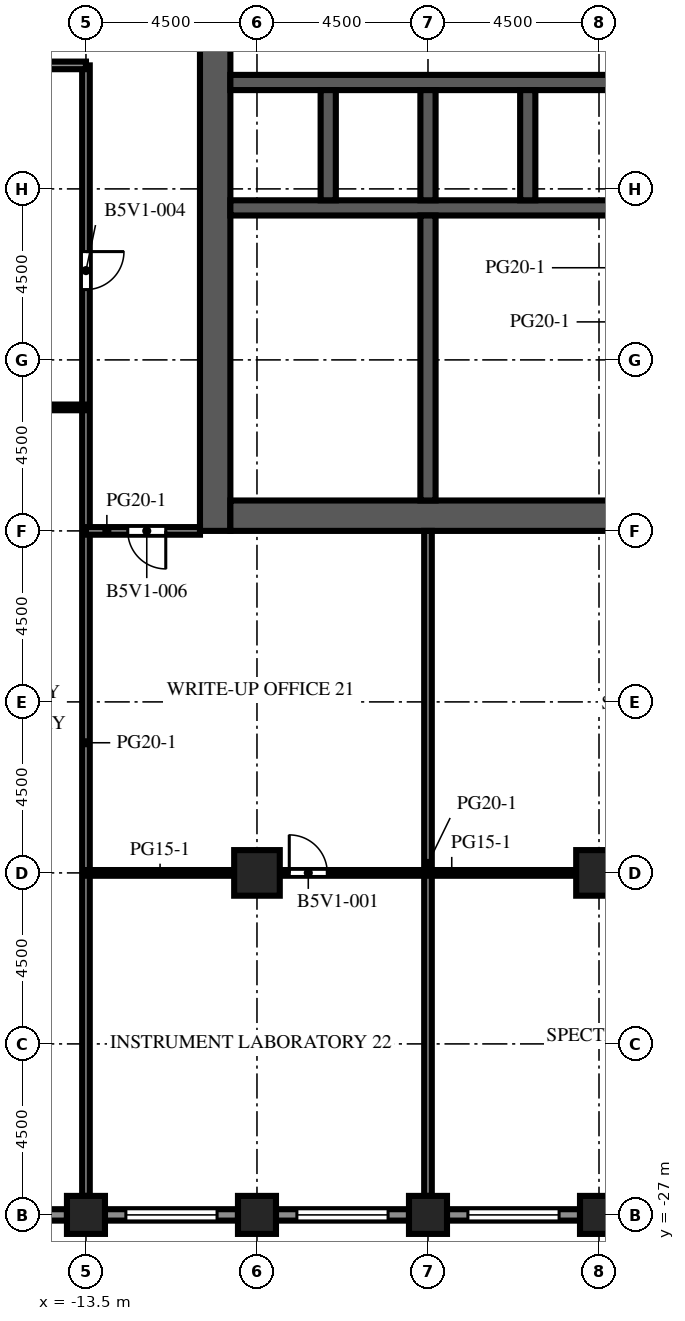
"""IFC4 building model, lengths in metres.
Left out: names, types, materials, properties, quantities, classifications, styles, units other than length and angle.
Written with IfcOpenShell. Run it as: python <this file> out.ifc"""

import sys

from ifc_helpers import new_model, si_unit, direction, frame, frame_2d, origin, origin_2d, place, context, subcontext, project, spatial, rectangle, extrude, element, fill, save


model = new_model("IFC4")
c1 = context("Model", 3, precision=1e-05, world=origin(), true_north=direction((0.0, 1.0)))
c2 = subcontext(c1, "Body", "Model", "MODEL_VIEW")
j1 = project(units=[si_unit("LENGTHUNIT", "METRE"), si_unit("PLANEANGLEUNIT", "RADIAN")], contexts=[c1])
p1 = place(None, origin())
s1 = spatial("IfcSite", under=j1, at=p1, CompositionType="ELEMENT")
p2 = place(p1, origin())
s2 = spatial("IfcBuilding", under=s1, at=p2, CompositionType="ELEMENT")
p3 = place(p2, frame((0.0, 0.0, 169.1)))
s3 = spatial("IfcBuildingStorey", under=s2, at=p3, CompositionType="ELEMENT", Elevation=169.1)
for number, where, z_axis, x_axis in (
    (1, (-13.5, -27.0, 0.0), (0.0, 0.0, 1.0), (1.0, 0.0, 0.0)),
    (2, (-9.0, -27.0, 0.0), (0.0, 0.0, 1.0), (1.0, 0.0, 0.0)),
    (3, (-4.5, -27.0, 0.0), (0.0, 0.0, 1.0), (1.0, 0.0, 0.0)),
    (4, (0.0, -27.0, 0.0), (0.0, 0.0, 1.0), (1.0, 0.0, 0.0)),
):
    element("IfcColumn", number, at=place(p3, frame(where, z_axis=z_axis, x_axis=x_axis)), inside=s3, PredefinedType="COLUMN", context=c2, shape_type="SweptSolid", body=[
        extrude(rectangle(XDim=1.0, YDim=1.0, at=origin_2d()), origin(), (0.0, 0.0, 1.0), 4.1),
    ])
for number, where, z_axis, x_axis in (
    (5, (-9.0, -18.0, 0.0), (0.0, 0.0, 1.0), (1.0, 0.0, 0.0)),
    (6, (0.0, -18.0, 0.0), (0.0, 0.0, 1.0), (1.0, 0.0, 0.0)),
):
    element("IfcColumn", number, at=place(p3, frame(where, z_axis=z_axis, x_axis=x_axis)), inside=s3, PredefinedType="COLUMN", context=c2, shape_type="SweptSolid", body=[
        extrude(rectangle(XDim=1.2, YDim=1.2, at=origin_2d()), origin(), (0.0, 0.0, 1.0), 4.1),
    ])
p4 = place(p3, frame((-10.1, -9.0, 0.0), z_axis=(0.0, 0.0, 1.0), x_axis=(0.0, 1.0, 0.0)))
e7 = element("IfcWall", 7, at=p4, inside=s3, PredefinedType="SHEAR", context=c2, shape_type="SweptSolid", body=[
    extrude(rectangle(XDim=27.5, YDim=0.8, at=frame_2d((13.75, 0.0))), origin(), (0.0, 0.0, 1.0), 4.1),
])
p5 = place(p4, frame((12.55, 0.0, 0.0)))
e8 = element("IfcOpeningElement", 8, at=p5, cuts=e7, PredefinedType="OPENING", context=c2, shape_type="SweptSolid", body=[
    extrude(rectangle(XDim=2.4, YDim=2.4, at=frame_2d((1.2, 1.2))), frame((0.0, 0.41, 0.0), z_axis=(0.0, -1.0, 0.0), x_axis=(1.0, 0.0, 0.0)), (0.0, 0.0, 1.0), 0.82),
])
p6 = place(p4, frame((6.825, 0.0, 0.0)))
e9 = element("IfcOpeningElement", 9, at=p6, cuts=e7, PredefinedType="OPENING", context=c2, shape_type="SweptSolid", body=[
    extrude(rectangle(XDim=1.2, YDim=2.1, at=frame_2d((0.6, 1.05))), frame((0.0, 0.41, 0.0), z_axis=(0.0, -1.0, 0.0), x_axis=(1.0, 0.0, 0.0)), (0.0, 0.0, 1.0), 0.82),
])
p7 = place(p4, frame((19.475, 0.0, 0.0)))
e10 = element("IfcOpeningElement", 10, at=p7, cuts=e7, PredefinedType="OPENING", context=c2, shape_type="SweptSolid", body=[
    extrude(rectangle(XDim=1.2, YDim=2.1, at=frame_2d((0.6, 1.05))), frame((0.0, 0.41, 0.0), z_axis=(0.0, -1.0, 0.0), x_axis=(1.0, 0.0, 0.0)), (0.0, 0.0, 1.0), 0.82),
])
p8 = place(p3, frame((-9.7, -8.6, 0.0), z_axis=(0.0, 0.0, 1.0), x_axis=(1.0, 0.0, 0.0)))
e11 = element("IfcWall", 11, at=p8, inside=s3, PredefinedType="SHEAR", context=c2, shape_type="SweptSolid", body=[
    extrude(rectangle(XDim=10.4, YDim=0.8, at=frame_2d((5.2, 0.0))), origin(), (0.0, 0.0, 1.0), 4.1),
])
p9 = place(p3, frame((-9.7, -0.5, 0.0), z_axis=(0.0, 0.0, 1.0), x_axis=(1.0, 0.0, 0.0)))
e12 = element("IfcWall", 12, at=p9, inside=s3, PredefinedType="SHEAR", context=c2, shape_type="SweptSolid", body=[
    extrude(rectangle(XDim=10.4, YDim=0.4, at=frame_2d((5.2, 0.0))), origin(), (0.0, 0.0, 1.0), 4.1),
])
p10 = place(p3, frame((-9.7, 2.8, 0.0), z_axis=(0.0, 0.0, 1.0), x_axis=(1.0, 0.0, 0.0)))
e13 = element("IfcWall", 13, at=p10, inside=s3, PredefinedType="SHEAR", context=c2, shape_type="SweptSolid", body=[
    extrude(rectangle(XDim=10.4, YDim=0.4, at=frame_2d((5.2, 0.0))), origin(), (0.0, 0.0, 1.0), 4.1),
])
p11 = place(p10, frame((0.738, 0.0, 0.0)))
e14 = element("IfcOpeningElement", 14, at=p11, cuts=e13, PredefinedType="OPENING", context=c2, shape_type="SweptSolid", body=[
    extrude(rectangle(XDim=1.1, YDim=2.1, at=frame_2d((0.55, 1.05))), frame((0.0, 0.21, 0.0), z_axis=(0.0, -1.0, 0.0), x_axis=(1.0, 0.0, 0.0)), (0.0, 0.0, 1.0), 0.42),
])
p12 = place(p10, frame((3.337, 0.0, 0.0)))
e15 = element("IfcOpeningElement", 15, at=p12, cuts=e13, PredefinedType="OPENING", context=c2, shape_type="SweptSolid", body=[
    extrude(rectangle(XDim=1.1, YDim=2.1, at=frame_2d((0.55, 1.05))), frame((0.0, 0.21, 0.0), z_axis=(0.0, -1.0, 0.0), x_axis=(1.0, 0.0, 0.0)), (0.0, 0.0, 1.0), 0.42),
])
p13 = place(p10, frame((6.012, 0.0, 0.0)))
e16 = element("IfcOpeningElement", 16, at=p13, cuts=e13, PredefinedType="OPENING", context=c2, shape_type="SweptSolid", body=[
    extrude(rectangle(XDim=1.0, YDim=2.1, at=frame_2d((0.5, 1.05))), frame((0.0, 0.21, 0.0), z_axis=(0.0, -1.0, 0.0), x_axis=(1.0, 0.0, 0.0)), (0.0, 0.0, 1.0), 0.42),
])
p14 = place(p10, frame((8.613, 0.0, 0.0)))
e17 = element("IfcOpeningElement", 17, at=p14, cuts=e13, PredefinedType="OPENING", context=c2, shape_type="SweptSolid", body=[
    extrude(rectangle(XDim=1.0, YDim=2.1, at=frame_2d((0.5, 1.05))), frame((0.0, 0.21, 0.0), z_axis=(0.0, -1.0, 0.0), x_axis=(1.0, 0.0, 0.0)), (0.0, 0.0, 1.0), 0.42),
])
for number, where, z_axis, x_axis in (
    (18, (-7.125, -0.3, 0.0), (0.0, 0.0, 1.0), (0.0, 1.0, 0.0)),
    (19, (-4.5, -0.3, 0.0), (0.0, 0.0, 1.0), (0.0, 1.0, 0.0)),
    (20, (-1.875, -0.3, 0.0), (0.0, 0.0, 1.0), (0.0, 1.0, 0.0)),
):
    element("IfcWall", number, at=place(p3, frame(where, z_axis=z_axis, x_axis=x_axis)), inside=s3, PredefinedType="SHEAR", context=c2, shape_type="SweptSolid", body=[
        extrude(rectangle(XDim=2.9, YDim=0.4, at=frame_2d((1.45, 0.0))), origin(), (0.0, 0.0, 1.0), 4.1),
    ])
p15 = place(p3, frame((-4.5, -8.2, 0.0), z_axis=(0.0, 0.0, 1.0), x_axis=(0.0, 1.0, 0.0)))
e21 = element("IfcWall", 21, at=p15, inside=s3, PredefinedType="SHEAR", context=c2, shape_type="SweptSolid", body=[
    extrude(rectangle(XDim=7.5, YDim=0.4, at=frame_2d((3.75, 0.0))), origin(), (0.0, 0.0, 1.0), 4.1),
])
p16 = place(p3, frame((-14.0, -27.0, 0.0), z_axis=(0.0, 0.0, 1.0), x_axis=(-1.0, 0.0, 0.0)))
e22 = element("IfcWall", 22, at=p16, inside=s3, PredefinedType="SOLIDWALL", context=c2, shape_type="SweptSolid", body=[
    extrude(rectangle(XDim=3.5, YDim=0.3, at=frame_2d((1.75, 0.0))), origin(), (0.0, 0.0, 1.0), 2.85),
])
p17 = place(p16, frame((1.25, 0.0, 0.0)))
e23 = element("IfcOpeningElement", 23, at=p17, cuts=e22, PredefinedType="OPENING", context=c2, shape_type="SweptSolid", body=[
    extrude(rectangle(XDim=1.0, YDim=2.2, at=frame_2d((0.5, 1.1))), frame((0.0, 0.16, 0.0), z_axis=(0.0, -1.0, 0.0), x_axis=(1.0, 0.0, 0.0)), (0.0, 0.0, 1.0), 0.32),
])
p18 = place(p3, frame((-9.5, -27.0, 0.0), z_axis=(0.0, 0.0, 1.0), x_axis=(-1.0, 0.0, 0.0)))
e24 = element("IfcWall", 24, at=p18, inside=s3, PredefinedType="SOLIDWALL", context=c2, shape_type="SweptSolid", body=[
    extrude(rectangle(XDim=3.5, YDim=0.3, at=frame_2d((1.75, 0.0))), origin(), (0.0, 0.0, 1.0), 2.85),
])
p19 = place(p18, frame((0.55, 0.0, 0.8)))
e25 = element("IfcOpeningElement", 25, at=p19, cuts=e24, PredefinedType="OPENING", context=c2, shape_type="SweptSolid", body=[
    extrude(rectangle(XDim=2.4, YDim=1.7, at=frame_2d((1.2, 0.85))), frame((0.0, 0.16, 0.0), z_axis=(0.0, -1.0, 0.0), x_axis=(1.0, 0.0, 0.0)), (0.0, 0.0, 1.0), 0.32),
])
p20 = place(p3, frame((-5.0, -27.0, 0.0), z_axis=(0.0, 0.0, 1.0), x_axis=(-1.0, 0.0, 0.0)))
e26 = element("IfcWall", 26, at=p20, inside=s3, PredefinedType="SOLIDWALL", context=c2, shape_type="SweptSolid", body=[
    extrude(rectangle(XDim=3.5, YDim=0.3, at=frame_2d((1.75, 0.0))), origin(), (0.0, 0.0, 1.0), 2.85),
])
p21 = place(p20, frame((0.55, 0.0, 0.8)))
e27 = element("IfcOpeningElement", 27, at=p21, cuts=e26, PredefinedType="OPENING", context=c2, shape_type="SweptSolid", body=[
    extrude(rectangle(XDim=2.4, YDim=1.7, at=frame_2d((1.2, 0.85))), frame((0.0, 0.16, 0.0), z_axis=(0.0, -1.0, 0.0), x_axis=(1.0, 0.0, 0.0)), (0.0, 0.0, 1.0), 0.32),
])
p22 = place(p3, frame((-0.5, -27.0, 0.0), z_axis=(0.0, 0.0, 1.0), x_axis=(-1.0, 0.0, 0.0)))
e28 = element("IfcWall", 28, at=p22, inside=s3, PredefinedType="SOLIDWALL", context=c2, shape_type="SweptSolid", body=[
    extrude(rectangle(XDim=3.5, YDim=0.3, at=frame_2d((1.75, 0.0))), origin(), (0.0, 0.0, 1.0), 2.85),
])
p23 = place(p22, frame((0.55, 0.0, 0.8)))
e29 = element("IfcOpeningElement", 29, at=p23, cuts=e28, PredefinedType="OPENING", context=c2, shape_type="SweptSolid", body=[
    extrude(rectangle(XDim=2.4, YDim=1.7, at=frame_2d((1.2, 0.85))), frame((0.0, 0.16, 0.0), z_axis=(0.0, -1.0, 0.0), x_axis=(1.0, 0.0, 0.0)), (0.0, 0.0, 1.0), 0.32),
])
p24 = place(p3, frame((-0.8, -8.2, 0.0), z_axis=(0.0, 0.0, 1.0), x_axis=(0.0, 1.0, 0.0)))
e30 = element("IfcWall", 30, at=p24, inside=s3, PredefinedType="PARTITIONING", context=c2, shape_type="SweptSolid", body=[
    extrude(rectangle(XDim=2.55, YDim=0.1, at=frame_2d((1.275, 0.0))), origin(), (0.0, 0.0, 1.0), 3.65),
])
p25 = place(p24, frame((0.775, 0.0, 0.0)))
e31 = element("IfcOpeningElement", 31, at=p25, cuts=e30, PredefinedType="OPENING", context=c2, shape_type="SweptSolid", body=[
    extrude(rectangle(XDim=1.0, YDim=2.1, at=frame_2d((0.5, 1.05))), frame((0.0, 0.06, 0.0), z_axis=(0.0, -1.0, 0.0), x_axis=(1.0, 0.0, 0.0)), (0.0, 0.0, 1.0), 0.12),
])
p26 = place(p3, frame((-0.8, -5.65, 0.0), z_axis=(0.0, 0.0, 1.0), x_axis=(0.0, 1.0, 0.0)))
e32 = element("IfcWall", 32, at=p26, inside=s3, PredefinedType="PARTITIONING", context=c2, shape_type="SweptSolid", body=[
    extrude(rectangle(XDim=2.1, YDim=0.1, at=frame_2d((1.05, 0.0))), origin(), (0.0, 0.0, 1.0), 3.65),
])
p27 = place(p26, frame((0.55, 0.0, 0.0)))
e33 = element("IfcOpeningElement", 33, at=p27, cuts=e32, PredefinedType="OPENING", context=c2, shape_type="SweptSolid", body=[
    extrude(rectangle(XDim=1.0, YDim=2.1, at=frame_2d((0.5, 1.05))), frame((0.0, 0.06, 0.0), z_axis=(0.0, -1.0, 0.0), x_axis=(1.0, 0.0, 0.0)), (0.0, 0.0, 1.0), 0.12),
])
p28 = place(p3, frame((-0.8, -3.55, 0.0), z_axis=(0.0, 0.0, 1.0), x_axis=(0.0, 1.0, 0.0)))
e34 = element("IfcWall", 34, at=p28, inside=s3, PredefinedType="PARTITIONING", context=c2, shape_type="SweptSolid", body=[
    extrude(rectangle(XDim=2.85, YDim=0.1, at=frame_2d((1.425, 0.0))), origin(), (0.0, 0.0, 1.0), 3.65),
])
p29 = place(p28, frame((0.925, 0.0, 0.0)))
e35 = element("IfcOpeningElement", 35, at=p29, cuts=e34, PredefinedType="OPENING", context=c2, shape_type="SweptSolid", body=[
    extrude(rectangle(XDim=1.0, YDim=2.1, at=frame_2d((0.5, 1.05))), frame((0.0, 0.06, 0.0), z_axis=(0.0, -1.0, 0.0), x_axis=(1.0, 0.0, 0.0)), (0.0, 0.0, 1.0), 0.12),
])
for number, where, z_axis, x_axis in (
    (36, (-4.3, -5.65, 0.0), (0.0, 0.0, 1.0), (1.0, 0.0, 0.0)),
    (37, (-4.3, -3.55, 0.0), (0.0, 0.0, 1.0), (1.0, 0.0, 0.0)),
):
    element("IfcWall", number, at=place(p3, frame(where, z_axis=z_axis, x_axis=x_axis)), inside=s3, PredefinedType="PARTITIONING", context=c2, shape_type="SweptSolid", body=[
        extrude(rectangle(XDim=3.5, YDim=0.1, at=frame_2d((1.75, 0.0))), origin(), (0.0, 0.0, 1.0), 3.65),
    ])
p30 = place(p3, frame((-13.5, -26.5, 0.0), z_axis=(0.0, 0.0, 1.0), x_axis=(0.0, 1.0, 0.0)))
e38 = element("IfcWall", 38, at=p30, inside=s3, PredefinedType="PARTITIONING", context=c2, shape_type="SweptSolid", body=[
    extrude(rectangle(XDim=29.75, YDim=0.2, at=frame_2d((14.875, 0.0))), origin(), (0.0, 0.0, 1.0), 3.65),
])
p31 = place(p30, frame((23.85, 0.0, 0.0)))
e39 = element("IfcOpeningElement", 39, at=p31, cuts=e38, PredefinedType="OPENING", context=c2, shape_type="SweptSolid", body=[
    extrude(rectangle(XDim=1.0, YDim=2.1, at=frame_2d((0.5, 1.05))), frame((0.0, 0.11, 0.0), z_axis=(0.0, -1.0, 0.0), x_axis=(1.0, 0.0, 0.0)), (0.0, 0.0, 1.0), 0.22),
])
p32 = place(p3, frame((-4.5, -26.5, 0.0), z_axis=(0.0, 0.0, 1.0), x_axis=(0.0, 1.0, 0.0)))
e40 = element("IfcWall", 40, at=p32, inside=s3, PredefinedType="PARTITIONING", context=c2, shape_type="SweptSolid", body=[
    extrude(rectangle(XDim=17.5, YDim=0.2, at=frame_2d((8.75, 0.0))), origin(), (0.0, 0.0, 1.0), 3.65),
])
p33 = place(p3, frame((-13.5, -18.0, 0.0), z_axis=(0.0, 0.0, 1.0), x_axis=(1.0, 0.0, 0.0)))
e41 = element("IfcWall", 41, at=p33, inside=s3, PredefinedType="PARTITIONING", context=c2, shape_type="SweptSolid", body=[
    extrude(rectangle(XDim=3.9, YDim=0.15, at=frame_2d((1.95, 0.0))), origin(), (0.0, 0.0, 1.0), 3.65),
])
p34 = place(p3, frame((-0.6, -18.0, 0.0), z_axis=(0.0, 0.0, 1.0), x_axis=(-1.0, 0.0, 0.0)))
e42 = element("IfcWall", 42, at=p34, inside=s3, PredefinedType="PARTITIONING", context=c2, shape_type="SweptSolid", body=[
    extrude(rectangle(XDim=7.8, YDim=0.15, at=frame_2d((3.9, 0.0))), origin(), (0.0, 0.0, 1.0), 3.65),
])
p35 = place(p34, frame((6.55, 0.0, 0.0)))
e43 = element("IfcOpeningElement", 43, at=p35, cuts=e42, PredefinedType="OPENING", context=c2, shape_type="SweptSolid", body=[
    extrude(rectangle(XDim=1.0, YDim=2.1, at=frame_2d((0.5, 1.05))), frame((0.0, 0.085, 0.0), z_axis=(0.0, -1.0, 0.0), x_axis=(1.0, 0.0, 0.0)), (0.0, 0.0, 1.0), 0.17),
])
p36 = place(p3, frame((-10.5, -9.0, 0.0), z_axis=(0.0, 0.0, 1.0), x_axis=(-1.0, 0.0, 0.0)))
e44 = element("IfcWall", 44, at=p36, inside=s3, PredefinedType="PARTITIONING", context=c2, shape_type="SweptSolid", body=[
    extrude(rectangle(XDim=3.0, YDim=0.2, at=frame_2d((1.5, 0.0))), origin(), (0.0, 0.0, 1.0), 3.65),
])
p37 = place(p36, frame((0.9, 0.0, 0.0)))
e45 = element("IfcOpeningElement", 45, at=p37, cuts=e44, PredefinedType="OPENING", context=c2, shape_type="SweptSolid", body=[
    extrude(rectangle(XDim=1.0, YDim=2.1, at=frame_2d((0.5, 1.05))), frame((0.0, 0.11, 0.0), z_axis=(0.0, -1.0, 0.0), x_axis=(1.0, 0.0, 0.0)), (0.0, 0.0, 1.0), 0.22),
])
p38 = place(p3, frame((-13.5, -5.75, 0.0), z_axis=(0.0, 0.0, 1.0), x_axis=(-1.0, 0.0, 0.0)))
e46 = element("IfcWall", 46, at=p38, inside=s3, PredefinedType="PARTITIONING", context=c2, shape_type="SweptSolid", body=[
    extrude(rectangle(XDim=13.35, YDim=0.15, at=frame_2d((6.675, 0.0))), origin(), (0.0, 0.0, 1.0), 3.65),
])
p39 = place(p38, frame((8.9, 0.0, 0.0)))
e47 = element("IfcOpeningElement", 47, at=p39, cuts=e46, PredefinedType="OPENING", context=c2, shape_type="SweptSolid", body=[
    extrude(rectangle(XDim=1.0, YDim=2.1, at=frame_2d((0.5, 1.05))), frame((0.0, 0.085, 0.0), z_axis=(0.0, -1.0, 0.0), x_axis=(1.0, 0.0, 0.0)), (0.0, 0.0, 1.0), 0.17),
])
p40 = place(p38, frame((1.65, 0.0, 0.0)))
e48 = element("IfcOpeningElement", 48, at=p40, cuts=e46, PredefinedType="OPENING", context=c2, shape_type="SweptSolid", body=[
    extrude(rectangle(XDim=1.0, YDim=2.1, at=frame_2d((0.5, 1.05))), frame((0.0, 0.085, 0.0), z_axis=(0.0, -1.0, 0.0), x_axis=(1.0, 0.0, 0.0)), (0.0, 0.0, 1.0), 0.17),
])
p41 = place(p3, frame((-13.5, 3.25, 0.0), z_axis=(0.0, 0.0, 1.0), x_axis=(-1.0, 0.0, 0.0)))
e49 = element("IfcWall", 49, at=p41, inside=s3, PredefinedType="PARTITIONING", context=c2, shape_type="SweptSolid", body=[
    extrude(rectangle(XDim=13.35, YDim=0.2, at=frame_2d((6.675, 0.0))), origin(), (0.0, 0.0, 1.0), 3.65),
])
p42 = place(p41, frame((8.15, 0.0, 0.0)))
e50 = element("IfcOpeningElement", 50, at=p42, cuts=e49, PredefinedType="OPENING", context=c2, shape_type="SweptSolid", body=[
    extrude(rectangle(XDim=1.0, YDim=2.1, at=frame_2d((0.5, 1.05))), frame((0.0, 0.11, 0.0), z_axis=(0.0, -1.0, 0.0), x_axis=(1.0, 0.0, 0.0)), (0.0, 0.0, 1.0), 0.22),
])
p43 = place(p19, origin())
e51 = element("IfcWindow", 51, at=p43, inside=s3, PartitioningType="SINGLE_PANEL", PredefinedType="WINDOW", context=c2, shape_type="SweptSolid", body=[
    extrude(rectangle(XDim=2.4, YDim=1.7, at=frame_2d((1.2, 0.85))), frame((0.0, 0.03, 0.0), z_axis=(0.0, -1.0, 0.0), x_axis=(1.0, 0.0, 0.0)), (0.0, 0.0, 1.0), 0.06),
])
fill(e25, e51)
p44 = place(p21, origin())
e52 = element("IfcWindow", 52, at=p44, inside=s3, PartitioningType="SINGLE_PANEL", PredefinedType="WINDOW", context=c2, shape_type="SweptSolid", body=[
    extrude(rectangle(XDim=2.4, YDim=1.7, at=frame_2d((1.2, 0.85))), frame((0.0, 0.03, 0.0), z_axis=(0.0, -1.0, 0.0), x_axis=(1.0, 0.0, 0.0)), (0.0, 0.0, 1.0), 0.06),
])
fill(e27, e52)
p45 = place(p23, origin())
e53 = element("IfcWindow", 53, at=p45, inside=s3, PartitioningType="SINGLE_PANEL", PredefinedType="WINDOW", context=c2, shape_type="SweptSolid", body=[
    extrude(rectangle(XDim=2.4, YDim=1.7, at=frame_2d((1.2, 0.85))), frame((0.0, 0.03, 0.0), z_axis=(0.0, -1.0, 0.0), x_axis=(1.0, 0.0, 0.0)), (0.0, 0.0, 1.0), 0.06),
])
fill(e29, e53)
p46 = place(p11, origin())
e54 = element("IfcDoor", 54, at=p46, inside=s3, OperationType="DOUBLE_DOOR_SLIDING", PredefinedType="DOOR", context=c2, shape_type="SweptSolid", body=[
    extrude(rectangle(XDim=1.1, YDim=2.1, at=frame_2d((0.55, 1.05))), frame((0.0, 0.025, 0.0), z_axis=(0.0, -1.0, 0.0), x_axis=(1.0, 0.0, 0.0)), (0.0, 0.0, 1.0), 0.05),
])
fill(e14, e54)
p47 = place(p12, origin())
e55 = element("IfcDoor", 55, at=p47, inside=s3, OperationType="DOUBLE_DOOR_SLIDING", PredefinedType="DOOR", context=c2, shape_type="SweptSolid", body=[
    extrude(rectangle(XDim=1.1, YDim=2.1, at=frame_2d((0.55, 1.05))), frame((0.0, 0.025, 0.0), z_axis=(0.0, -1.0, 0.0), x_axis=(1.0, 0.0, 0.0)), (0.0, 0.0, 1.0), 0.05),
])
fill(e15, e55)
p48 = place(p5, origin())
e56 = element("IfcDoor", 56, at=p48, inside=s3, OperationType="DOUBLE_DOOR_DOUBLE_SWING", PredefinedType="DOOR", context=c2, shape_type="SweptSolid", body=[
    extrude(rectangle(XDim=2.4, YDim=2.4, at=frame_2d((1.2, 1.2))), frame((0.0, 0.025, 0.0), z_axis=(0.0, -1.0, 0.0), x_axis=(1.0, 0.0, 0.0)), (0.0, 0.0, 1.0), 0.05),
])
fill(e8, e56)
p49 = place(p6, origin())
e57 = element("IfcDoor", 57, at=p49, inside=s3, OperationType="SINGLE_SWING_LEFT", PredefinedType="DOOR", context=c2, shape_type="SweptSolid", body=[
    extrude(rectangle(XDim=1.2, YDim=2.1, at=frame_2d((0.6, 1.05))), frame((0.0, 0.025, 0.0), z_axis=(0.0, -1.0, 0.0), x_axis=(1.0, 0.0, 0.0)), (0.0, 0.0, 1.0), 0.05),
])
fill(e9, e57)
p50 = place(p13, origin())
e58 = element("IfcDoor", 58, at=p50, inside=s3, OperationType="SINGLE_SWING_LEFT", PredefinedType="DOOR", context=c2, shape_type="SweptSolid", body=[
    extrude(rectangle(XDim=1.0, YDim=2.1, at=frame_2d((0.5, 1.05))), frame((0.0, 0.025, 0.0), z_axis=(0.0, -1.0, 0.0), x_axis=(1.0, 0.0, 0.0)), (0.0, 0.0, 1.0), 0.05),
])
fill(e16, e58)
p51 = place(p14, origin())
e59 = element("IfcDoor", 59, at=p51, inside=s3, OperationType="SINGLE_SWING_RIGHT", PredefinedType="DOOR", context=c2, shape_type="SweptSolid", body=[
    extrude(rectangle(XDim=1.0, YDim=2.1, at=frame_2d((0.5, 1.05))), frame((0.0, 0.025, 0.0), z_axis=(0.0, -1.0, 0.0), x_axis=(1.0, 0.0, 0.0)), (0.0, 0.0, 1.0), 0.05),
])
fill(e17, e59)
p52 = place(p25, origin())
e60 = element("IfcDoor", 60, at=p52, inside=s3, OperationType="SINGLE_SWING_RIGHT", PredefinedType="DOOR", context=c2, shape_type="SweptSolid", body=[
    extrude(rectangle(XDim=1.0, YDim=2.1, at=frame_2d((0.5, 1.05))), frame((0.0, 0.025, 0.0), z_axis=(0.0, -1.0, 0.0), x_axis=(1.0, 0.0, 0.0)), (0.0, 0.0, 1.0), 0.05),
])
fill(e31, e60)
p53 = place(p27, origin())
e61 = element("IfcDoor", 61, at=p53, inside=s3, OperationType="SINGLE_SWING_LEFT", PredefinedType="DOOR", context=c2, shape_type="SweptSolid", body=[
    extrude(rectangle(XDim=1.0, YDim=2.1, at=frame_2d((0.5, 1.05))), frame((0.0, 0.025, 0.0), z_axis=(0.0, -1.0, 0.0), x_axis=(1.0, 0.0, 0.0)), (0.0, 0.0, 1.0), 0.05),
])
fill(e33, e61)
p54 = place(p29, origin())
e62 = element("IfcDoor", 62, at=p54, inside=s3, OperationType="SINGLE_SWING_RIGHT", PredefinedType="DOOR", context=c2, shape_type="SweptSolid", body=[
    extrude(rectangle(XDim=1.0, YDim=2.1, at=frame_2d((0.5, 1.05))), frame((0.0, 0.025, 0.0), z_axis=(0.0, -1.0, 0.0), x_axis=(1.0, 0.0, 0.0)), (0.0, 0.0, 1.0), 0.05),
])
fill(e35, e62)
p55 = place(p35, origin())
e63 = element("IfcDoor", 63, at=p55, inside=s3, OperationType="SINGLE_SWING_RIGHT", PredefinedType="DOOR", context=c2, shape_type="SweptSolid", body=[
    extrude(rectangle(XDim=1.0, YDim=2.1, at=frame_2d((0.5, 1.05))), frame((0.0, 0.025, 0.0), z_axis=(0.0, -1.0, 0.0), x_axis=(1.0, 0.0, 0.0)), (0.0, 0.0, 1.0), 0.05),
])
fill(e43, e63)
p56 = place(p31, origin())
e64 = element("IfcDoor", 64, at=p56, inside=s3, OperationType="SINGLE_SWING_RIGHT", PredefinedType="DOOR", context=c2, shape_type="SweptSolid", body=[
    extrude(rectangle(XDim=1.0, YDim=2.1, at=frame_2d((0.5, 1.05))), frame((0.0, 0.025, 0.0), z_axis=(0.0, -1.0, 0.0), x_axis=(1.0, 0.0, 0.0)), (0.0, 0.0, 1.0), 0.05),
])
fill(e39, e64)
p57 = place(p37, origin())
e65 = element("IfcDoor", 65, at=p57, inside=s3, OperationType="SINGLE_SWING_LEFT", PredefinedType="DOOR", context=c2, shape_type="SweptSolid", body=[
    extrude(rectangle(XDim=1.0, YDim=2.1, at=frame_2d((0.5, 1.05))), frame((0.0, 0.025, 0.0), z_axis=(0.0, -1.0, 0.0), x_axis=(1.0, 0.0, 0.0)), (0.0, 0.0, 1.0), 0.05),
])
fill(e45, e65)
save(model, sys.argv[1])
